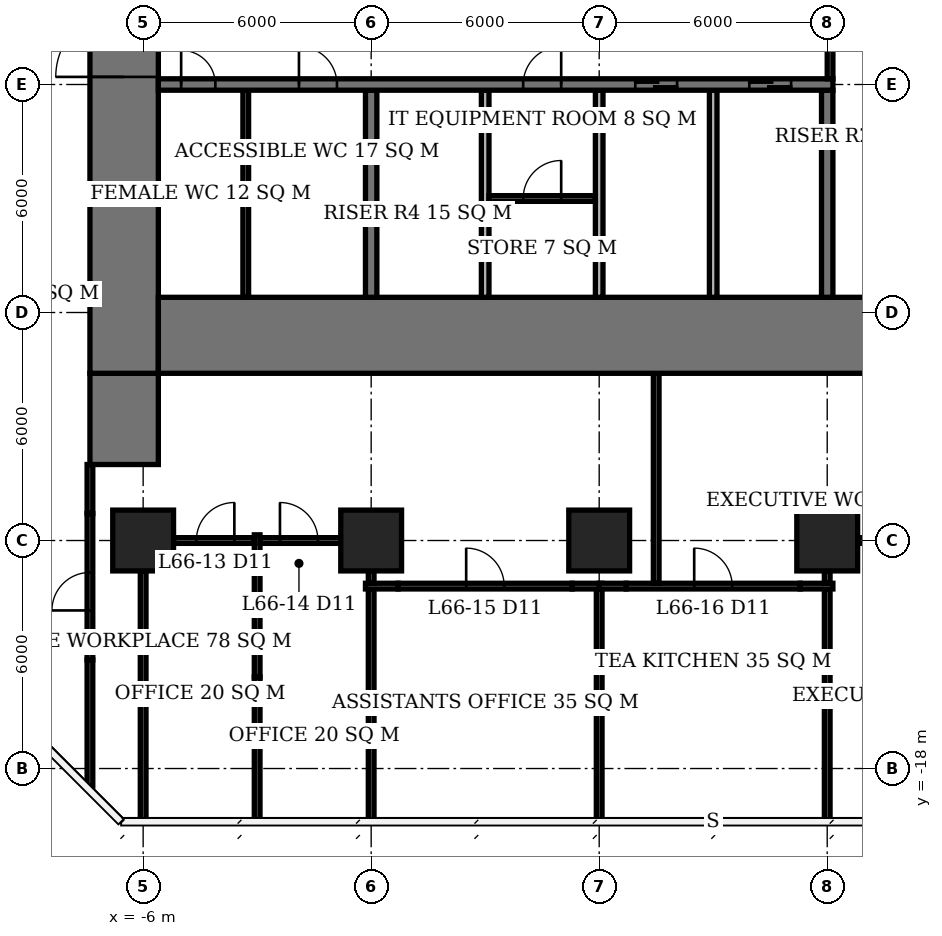
"""IFC4 building model, lengths in metres.
Left out: names, types, materials, properties, quantities, classifications, styles, units other than length and angle.
Written with IfcOpenShell. Run it as: python <this file> out.ifc"""

import sys

from ifc_helpers import new_model, si_unit, direction, frame, frame_2d, origin, origin_2d, place, context, subcontext, project, spatial, rectangle, extrude, element, fill, save


model = new_model("IFC4")
c1 = context("Model", 3, precision=1e-05, world=origin(), true_north=direction((0.0, 1.0)))
c2 = subcontext(c1, "Body", "Model", "MODEL_VIEW")
j1 = project(units=[si_unit("LENGTHUNIT", "METRE"), si_unit("PLANEANGLEUNIT", "RADIAN")], contexts=[c1])
p1 = place(None, origin())
s1 = spatial("IfcSite", under=j1, at=p1, CompositionType="ELEMENT")
p2 = place(p1, origin())
s2 = spatial("IfcBuilding", under=s1, at=p2, CompositionType="ELEMENT")
p3 = place(p2, frame((0.0, 0.0, 268.4)))
s3 = spatial("IfcBuildingStorey", under=s2, at=p3, CompositionType="ELEMENT", Elevation=268.4)
for number, where, z_axis, x_axis in (
    (1, (-6.0, -12.0, 0.0), (0.0, 0.0, 1.0), (1.0, 0.0, 0.0)),
    (2, (0.0, -12.0, 0.0), (0.0, 0.0, 1.0), (1.0, 0.0, 0.0)),
    (3, (6.0, -12.0, 0.0), (0.0, 0.0, 1.0), (1.0, 0.0, 0.0)),
    (4, (12.0, -12.0, 0.0), (0.0, 0.0, 1.0), (1.0, 0.0, 0.0)),
):
    element("IfcColumn", number, at=place(p3, frame(where, z_axis=z_axis, x_axis=x_axis)), inside=s3, PredefinedType="COLUMN", context=c2, shape_type="SweptSolid", body=[
        extrude(rectangle(XDim=1.6, YDim=1.6, at=origin_2d()), origin(), (0.0, 0.0, 1.0), 3.9),
    ])
p4 = place(p3, frame((-5.6, -6.6, 0.0), z_axis=(0.0, 0.0, 1.0), x_axis=(1.0, 0.0, 0.0)))
e5 = element("IfcWall", 5, at=p4, inside=s3, PredefinedType="SHEAR", context=c2, shape_type="SweptSolid", body=[
    extrude(rectangle(XDim=23.2, YDim=2.0, at=frame_2d((11.6, 0.0))), origin(), (0.0, 0.0, 1.0), 3.9),
])
p5 = place(p3, frame((-6.5, -7.6, 0.0), z_axis=(0.0, 0.0, 1.0), x_axis=(0.0, 1.0, 0.0)))
e6 = element("IfcWall", 6, at=p5, inside=s3, PredefinedType="SHEAR", context=c2, shape_type="SweptSolid", body=[
    extrude(rectangle(XDim=21.2, YDim=1.8, at=frame_2d((10.6, 0.0))), origin(), (0.0, 0.0, 1.0), 3.9),
])
p6 = place(p5, frame((7.8, 0.0, 0.0)))
e7 = element("IfcOpeningElement", 7, at=p6, cuts=e6, PredefinedType="OPENING", context=c2, shape_type="SweptSolid", body=[
    extrude(rectangle(XDim=1.8, YDim=2.4, at=frame_2d((0.9, 1.2))), frame((0.0, 0.91, 0.0), z_axis=(0.0, -1.0, 0.0), x_axis=(1.0, 0.0, 0.0)), (0.0, 0.0, 1.0), 1.82),
])
p7 = place(p3, frame((-6.5, -10.0, 0.0), z_axis=(0.0, 0.0, 1.0), x_axis=(0.0, 1.0, 0.0)))
e8 = element("IfcWall", 8, at=p7, inside=s3, PredefinedType="SHEAR", context=c2, shape_type="SweptSolid", body=[
    extrude(rectangle(XDim=2.4, YDim=1.8, at=frame_2d((1.2, 0.0))), origin(), (0.0, 0.0, 1.0), 3.9),
])
p8 = place(p3, frame((-5.6, 0.0, 0.0), z_axis=(0.0, 0.0, 1.0), x_axis=(1.0, 0.0, 0.0)))
e9 = element("IfcWall", 9, at=p8, inside=s3, PredefinedType="SHEAR", context=c2, shape_type="SweptSolid", body=[
    extrude(rectangle(XDim=17.75, YDim=0.3, at=frame_2d((8.875, 0.0))), origin(), (0.0, 0.0, 1.0), 3.9),
])
p9 = place(p8, frame((0.6, 0.0, 0.0)))
e10 = element("IfcOpeningElement", 10, at=p9, cuts=e9, PredefinedType="OPENING", context=c2, shape_type="SweptSolid", body=[
    extrude(rectangle(XDim=0.9, YDim=2.1, at=frame_2d((0.45, 1.05))), frame((0.0, 0.16, 0.0), z_axis=(0.0, -1.0, 0.0), x_axis=(1.0, 0.0, 0.0)), (0.0, 0.0, 1.0), 0.32),
])
p10 = place(p8, frame((3.7, 0.0, 0.0)))
e11 = element("IfcOpeningElement", 11, at=p10, cuts=e9, PredefinedType="OPENING", context=c2, shape_type="SweptSolid", body=[
    extrude(rectangle(XDim=1.0, YDim=2.1, at=frame_2d((0.5, 1.05))), frame((0.0, 0.16, 0.0), z_axis=(0.0, -1.0, 0.0), x_axis=(1.0, 0.0, 0.0)), (0.0, 0.0, 1.0), 0.32),
])
p11 = place(p8, frame((9.6, 0.0, 0.0)))
e12 = element("IfcOpeningElement", 12, at=p11, cuts=e9, PredefinedType="OPENING", context=c2, shape_type="SweptSolid", body=[
    extrude(rectangle(XDim=1.0, YDim=2.1, at=frame_2d((0.5, 1.05))), frame((0.0, 0.16, 0.0), z_axis=(0.0, -1.0, 0.0), x_axis=(1.0, 0.0, 0.0)), (0.0, 0.0, 1.0), 0.32),
])
p12 = place(p8, frame((12.55, 0.0, 0.0)))
e13 = element("IfcOpeningElement", 13, at=p12, cuts=e9, PredefinedType="OPENING", context=c2, shape_type="SweptSolid", body=[
    extrude(rectangle(XDim=1.1, YDim=2.1, at=frame_2d((0.55, 1.05))), frame((0.0, 0.16, 0.0), z_axis=(0.0, -1.0, 0.0), x_axis=(1.0, 0.0, 0.0)), (0.0, 0.0, 1.0), 0.32),
])
p13 = place(p8, frame((15.55, 0.0, 0.0)))
e14 = element("IfcOpeningElement", 14, at=p13, cuts=e9, PredefinedType="OPENING", context=c2, shape_type="SweptSolid", body=[
    extrude(rectangle(XDim=1.1, YDim=2.1, at=frame_2d((0.55, 1.05))), frame((0.0, 0.16, 0.0), z_axis=(0.0, -1.0, 0.0), x_axis=(1.0, 0.0, 0.0)), (0.0, 0.0, 1.0), 0.32),
])
for number, where, z_axis, x_axis in (
    (15, (0.0, -5.6, 0.0), (0.0, 0.0, 1.0), (0.0, 1.0, 0.0)),
    (16, (12.0, -5.6, 0.0), (0.0, 0.0, 1.0), (0.0, 1.0, 0.0)),
):
    element("IfcWall", number, at=place(p3, frame(where, z_axis=z_axis, x_axis=x_axis)), inside=s3, PredefinedType="SHEAR", context=c2, shape_type="SweptSolid", body=[
        extrude(rectangle(XDim=5.45, YDim=0.3, at=frame_2d((2.725, 0.0))), origin(), (0.0, 0.0, 1.0), 3.9),
    ])
for number, where, z_axis, x_axis in (
    (17, (3.0, -5.6, 0.0), (0.0, 0.0, 1.0), (0.0, 1.0, 0.0)),
    (18, (6.0, -5.6, 0.0), (0.0, 0.0, 1.0), (0.0, 1.0, 0.0)),
    (19, (9.0, -5.6, 0.0), (0.0, 0.0, 1.0), (0.0, 1.0, 0.0)),
):
    element("IfcWall", number, at=place(p3, frame(where, z_axis=z_axis, x_axis=x_axis)), inside=s3, PredefinedType="SOLIDWALL", context=c2, shape_type="SweptSolid", body=[
        extrude(rectangle(XDim=5.45, YDim=0.2, at=frame_2d((2.725, 0.0))), origin(), (0.0, 0.0, 1.0), 3.9),
    ])
p14 = place(p3, frame((-3.3, -5.6, 0.0), z_axis=(0.0, 0.0, 1.0), x_axis=(0.0, 1.0, 0.0)))
e20 = element("IfcWall", 20, at=p14, inside=s3, PredefinedType="PLUMBINGWALL", context=c2, shape_type="SweptSolid", body=[
    extrude(rectangle(XDim=5.45, YDim=0.15, at=frame_2d((2.725, 0.0))), origin(), (0.0, 0.0, 1.0), 3.65),
])
p15 = place(p3, frame((3.1, -3.0, 0.0), z_axis=(0.0, 0.0, 1.0), x_axis=(1.0, 0.0, 0.0)))
e21 = element("IfcWall", 21, at=p15, inside=s3, PredefinedType="PARTITIONING", context=c2, shape_type="SweptSolid", body=[
    extrude(rectangle(XDim=2.8, YDim=0.15, at=frame_2d((1.4, 0.0))), origin(), (0.0, 0.0, 1.0), 3.65),
])
p16 = place(p15, frame((0.9, 0.0, 0.0)))
e22 = element("IfcOpeningElement", 22, at=p16, cuts=e21, PredefinedType="OPENING", context=c2, shape_type="SweptSolid", body=[
    extrude(rectangle(XDim=1.0, YDim=2.1, at=frame_2d((0.5, 1.05))), frame((0.0, 0.085, 0.0), z_axis=(0.0, -1.0, 0.0), x_axis=(1.0, 0.0, 0.0)), (0.0, 0.0, 1.0), 0.17),
])
p17 = place(p3, frame((-0.15, -13.2, 0.0), z_axis=(0.0, 0.0, 1.0), x_axis=(1.0, 0.0, 0.0)))
e23 = element("IfcWall", 23, at=p17, inside=s3, PredefinedType="PARTITIONING", context=c2, shape_type="SweptSolid", body=[
    extrude(rectangle(XDim=0.86, YDim=0.15, at=frame_2d((0.43, 0.0))), origin(), (0.0, 0.0, 1.0), 2.65),
])
p18 = place(p3, frame((0.71, -13.2, 0.0), z_axis=(0.0, 0.0, 1.0), x_axis=(1.0, 0.0, 0.0)))
e24 = element("IfcWall", 24, at=p18, inside=s3, PredefinedType="PARTITIONING", context=c2, shape_type="SweptSolid", body=[
    extrude(rectangle(XDim=4.58, YDim=0.15, at=frame_2d((2.29, 0.0))), origin(), (0.0, 0.0, 1.0), 3.65),
])
p19 = place(p18, frame((1.79, 0.0, 0.0)))
e25 = element("IfcOpeningElement", 25, at=p19, cuts=e24, PredefinedType="OPENING", context=c2, shape_type="SweptSolid", body=[
    extrude(rectangle(XDim=1.0, YDim=2.4, at=frame_2d((0.5, 1.2))), frame((0.0, 0.085, 0.0), z_axis=(0.0, -1.0, 0.0), x_axis=(1.0, 0.0, 0.0)), (0.0, 0.0, 1.0), 0.17),
])
p20 = place(p3, frame((5.29, -13.2, 0.0), z_axis=(0.0, 0.0, 1.0), x_axis=(1.0, 0.0, 0.0)))
e26 = element("IfcWall", 26, at=p20, inside=s3, PredefinedType="PARTITIONING", context=c2, shape_type="SweptSolid", body=[
    extrude(rectangle(XDim=0.785, YDim=0.15, at=frame_2d((0.393, 0.0))), origin(), (0.0, 0.0, 1.0), 2.65),
])
p21 = place(p3, frame((6.0, -13.2, 0.0), z_axis=(0.0, 0.0, 1.0), x_axis=(1.0, 0.0, 0.0)))
e27 = element("IfcWall", 27, at=p21, inside=s3, PredefinedType="PARTITIONING", context=c2, shape_type="SweptSolid", body=[
    extrude(rectangle(XDim=0.71, YDim=0.15, at=frame_2d((0.355, 0.0))), origin(), (0.0, 0.0, 1.0), 2.65),
])
p22 = place(p3, frame((6.71, -13.2, 0.0), z_axis=(0.0, 0.0, 1.0), x_axis=(1.0, 0.0, 0.0)))
e28 = element("IfcWall", 28, at=p22, inside=s3, PredefinedType="PARTITIONING", context=c2, shape_type="SweptSolid", body=[
    extrude(rectangle(XDim=4.58, YDim=0.15, at=frame_2d((2.29, 0.0))), origin(), (0.0, 0.0, 1.0), 3.65),
])
p23 = place(p22, frame((1.79, 0.0, 0.0)))
e29 = element("IfcOpeningElement", 29, at=p23, cuts=e28, PredefinedType="OPENING", context=c2, shape_type="SweptSolid", body=[
    extrude(rectangle(XDim=1.0, YDim=2.4, at=frame_2d((0.5, 1.2))), frame((0.0, 0.085, 0.0), z_axis=(0.0, -1.0, 0.0), x_axis=(1.0, 0.0, 0.0)), (0.0, 0.0, 1.0), 0.17),
])
p24 = place(p3, frame((11.29, -13.2, 0.0), z_axis=(0.0, 0.0, 1.0), x_axis=(1.0, 0.0, 0.0)))
e30 = element("IfcWall", 30, at=p24, inside=s3, PredefinedType="PARTITIONING", context=c2, shape_type="SweptSolid", body=[
    extrude(rectangle(XDim=0.86, YDim=0.15, at=frame_2d((0.43, 0.0))), origin(), (0.0, 0.0, 1.0), 2.65),
])
p25 = place(p3, frame((-5.2, -12.0, 0.0), z_axis=(0.0, 0.0, 1.0), x_axis=(1.0, 0.0, 0.0)))
e31 = element("IfcWall", 31, at=p25, inside=s3, PredefinedType="PARTITIONING", context=c2, shape_type="SweptSolid", body=[
    extrude(rectangle(XDim=2.125, YDim=0.15, at=frame_2d((1.062, 0.0))), origin(), (0.0, 0.0, 1.0), 3.65),
])
p26 = place(p25, frame((0.6, 0.0, 0.0)))
e32 = element("IfcOpeningElement", 32, at=p26, cuts=e31, PredefinedType="OPENING", context=c2, shape_type="SweptSolid", body=[
    extrude(rectangle(XDim=1.0, YDim=2.4, at=frame_2d((0.5, 1.2))), frame((0.0, 0.085, 0.0), z_axis=(0.0, -1.0, 0.0), x_axis=(1.0, 0.0, 0.0)), (0.0, 0.0, 1.0), 0.17),
])
p27 = place(p3, frame((-2.925, -12.0, 0.0), z_axis=(0.0, 0.0, 1.0), x_axis=(1.0, 0.0, 0.0)))
e33 = element("IfcWall", 33, at=p27, inside=s3, PredefinedType="PARTITIONING", context=c2, shape_type="SweptSolid", body=[
    extrude(rectangle(XDim=2.125, YDim=0.15, at=frame_2d((1.062, 0.0))), origin(), (0.0, 0.0, 1.0), 3.65),
])
p28 = place(p27, frame((0.525, 0.0, 0.0)))
e34 = element("IfcOpeningElement", 34, at=p28, cuts=e33, PredefinedType="OPENING", context=c2, shape_type="SweptSolid", body=[
    extrude(rectangle(XDim=1.0, YDim=2.4, at=frame_2d((0.5, 1.2))), frame((0.0, 0.085, 0.0), z_axis=(0.0, -1.0, 0.0), x_axis=(1.0, 0.0, 0.0)), (0.0, 0.0, 1.0), 0.17),
])
p29 = place(p3, frame((12.8, -12.0, 0.0), z_axis=(0.0, 0.0, 1.0), x_axis=(1.0, 0.0, 0.0)))
e35 = element("IfcWall", 35, at=p29, inside=s3, PredefinedType="PARTITIONING", context=c2, shape_type="SweptSolid", body=[
    extrude(rectangle(XDim=4.3, YDim=0.15, at=frame_2d((2.15, 0.0))), origin(), (0.0, 0.0, 1.0), 3.65),
])
p30 = place(p29, frame((1.65, 0.0, 0.0)))
e36 = element("IfcOpeningElement", 36, at=p30, cuts=e35, PredefinedType="OPENING", context=c2, shape_type="SweptSolid", body=[
    extrude(rectangle(XDim=1.0, YDim=2.4, at=frame_2d((0.5, 1.2))), frame((0.0, 0.085, 0.0), z_axis=(0.0, -1.0, 0.0), x_axis=(1.0, 0.0, 0.0)), (0.0, 0.0, 1.0), 0.17),
])
p31 = place(p3, frame((-6.0, -19.375, 0.0), z_axis=(0.0, 0.0, 1.0), x_axis=(0.0, 1.0, 0.0)))
e37 = element("IfcWall", 37, at=p31, inside=s3, PredefinedType="PARTITIONING", context=c2, shape_type="SweptSolid", body=[
    extrude(rectangle(XDim=3.065, YDim=0.15, at=frame_2d((1.532, 0.0))), origin(), (0.0, 0.0, 1.0), 3.65),
])
p32 = place(p3, frame((-6.0, -16.31, 0.0), z_axis=(0.0, 0.0, 1.0), x_axis=(0.0, 1.0, 0.0)))
e38 = element("IfcWall", 38, at=p32, inside=s3, PredefinedType="PARTITIONING", context=c2, shape_type="SweptSolid", body=[
    extrude(rectangle(XDim=3.51, YDim=0.15, at=frame_2d((1.755, 0.0))), origin(), (0.0, 0.0, 1.0), 2.65),
])
p33 = place(p3, frame((-3.0, -19.375, 0.0), z_axis=(0.0, 0.0, 1.0), x_axis=(0.0, 1.0, 0.0)))
e39 = element("IfcWall", 39, at=p33, inside=s3, PredefinedType="PARTITIONING", context=c2, shape_type="SweptSolid", body=[
    extrude(rectangle(XDim=3.065, YDim=0.15, at=frame_2d((1.532, 0.0))), origin(), (0.0, 0.0, 1.0), 3.65),
])
p34 = place(p3, frame((-3.0, -16.31, 0.0), z_axis=(0.0, 0.0, 1.0), x_axis=(0.0, 1.0, 0.0)))
e40 = element("IfcWall", 40, at=p34, inside=s3, PredefinedType="PARTITIONING", context=c2, shape_type="SweptSolid", body=[
    extrude(rectangle(XDim=0.72, YDim=0.15, at=frame_2d((0.36, 0.0))), origin(), (0.0, 0.0, 1.0), 2.65),
])
p35 = place(p3, frame((-3.0, -15.59, 0.0), z_axis=(0.0, 0.0, 1.0), x_axis=(0.0, 1.0, 0.0)))
e41 = element("IfcWall", 41, at=p35, inside=s3, PredefinedType="PARTITIONING", context=c2, shape_type="SweptSolid", body=[
    extrude(rectangle(XDim=3.74, YDim=0.15, at=frame_2d((1.87, 0.0))), origin(), (0.0, 0.0, 1.0), 3.65),
])
p36 = place(p3, frame((0.0, -19.375, 0.0), z_axis=(0.0, 0.0, 1.0), x_axis=(0.0, 1.0, 0.0)))
e42 = element("IfcWall", 42, at=p36, inside=s3, PredefinedType="PARTITIONING", context=c2, shape_type="SweptSolid", body=[
    extrude(rectangle(XDim=3.065, YDim=0.15, at=frame_2d((1.532, 0.0))), origin(), (0.0, 0.0, 1.0), 3.65),
])
p37 = place(p3, frame((0.0, -16.31, 0.0), z_axis=(0.0, 0.0, 1.0), x_axis=(0.0, 1.0, 0.0)))
e43 = element("IfcWall", 43, at=p37, inside=s3, PredefinedType="PARTITIONING", context=c2, shape_type="SweptSolid", body=[
    extrude(rectangle(XDim=3.035, YDim=0.15, at=frame_2d((1.518, 0.0))), origin(), (0.0, 0.0, 1.0), 2.65),
])
p38 = place(p3, frame((0.0, -13.125, 0.0), z_axis=(0.0, 0.0, 1.0), x_axis=(0.0, 1.0, 0.0)))
e44 = element("IfcWall", 44, at=p38, inside=s3, PredefinedType="PARTITIONING", context=c2, shape_type="SweptSolid", body=[
    extrude(rectangle(XDim=0.325, YDim=0.15, at=frame_2d((0.163, 0.0))), origin(), (0.0, 0.0, 1.0), 2.65),
])
p39 = place(p3, frame((6.0, -19.35, 0.0), z_axis=(0.0, 0.0, 1.0), x_axis=(0.0, 1.0, 0.0)))
e45 = element("IfcWall", 45, at=p39, inside=s3, PredefinedType="PARTITIONING", context=c2, shape_type="SweptSolid", body=[
    extrude(rectangle(XDim=3.04, YDim=0.15, at=frame_2d((1.52, 0.0))), origin(), (0.0, 0.0, 1.0), 3.65),
])
p40 = place(p3, frame((6.0, -16.31, 0.0), z_axis=(0.0, 0.0, 1.0), x_axis=(0.0, 1.0, 0.0)))
e46 = element("IfcWall", 46, at=p40, inside=s3, PredefinedType="PARTITIONING", context=c2, shape_type="SweptSolid", body=[
    extrude(rectangle(XDim=3.035, YDim=0.15, at=frame_2d((1.518, 0.0))), origin(), (0.0, 0.0, 1.0), 2.65),
])
p41 = place(p3, frame((12.0, -19.35, 0.0), z_axis=(0.0, 0.0, 1.0), x_axis=(0.0, 1.0, 0.0)))
e47 = element("IfcWall", 47, at=p41, inside=s3, PredefinedType="PARTITIONING", context=c2, shape_type="SweptSolid", body=[
    extrude(rectangle(XDim=3.04, YDim=0.15, at=frame_2d((1.52, 0.0))), origin(), (0.0, 0.0, 1.0), 3.65),
])
p42 = place(p3, frame((12.0, -16.31, 0.0), z_axis=(0.0, 0.0, 1.0), x_axis=(0.0, 1.0, 0.0)))
e48 = element("IfcWall", 48, at=p42, inside=s3, PredefinedType="PARTITIONING", context=c2, shape_type="SweptSolid", body=[
    extrude(rectangle(XDim=3.035, YDim=0.15, at=frame_2d((1.518, 0.0))), origin(), (0.0, 0.0, 1.0), 2.65),
])
p43 = place(p3, frame((12.0, -13.125, 0.0), z_axis=(0.0, 0.0, 1.0), x_axis=(0.0, 1.0, 0.0)))
e49 = element("IfcWall", 49, at=p43, inside=s3, PredefinedType="PARTITIONING", context=c2, shape_type="SweptSolid", body=[
    extrude(rectangle(XDim=0.325, YDim=0.15, at=frame_2d((0.163, 0.0))), origin(), (0.0, 0.0, 1.0), 2.65),
])
p44 = place(p3, frame((-7.4, -18.464, 0.0), z_axis=(0.0, 0.0, 1.0), x_axis=(0.0, 1.0, 0.0)))
e50 = element("IfcWall", 50, at=p44, inside=s3, PredefinedType="PARTITIONING", context=c2, shape_type="SweptSolid", body=[
    extrude(rectangle(XDim=3.324, YDim=0.15, at=frame_2d((1.662, 0.0))), origin(), (0.0, 0.0, 1.0), 3.65),
])
p45 = place(p3, frame((-7.4, -15.14, 0.0), z_axis=(0.0, 0.0, 1.0), x_axis=(0.0, 1.0, 0.0)))
e51 = element("IfcWall", 51, at=p45, inside=s3, PredefinedType="PARTITIONING", context=c2, shape_type="SweptSolid", body=[
    extrude(rectangle(XDim=3.85, YDim=0.15, at=frame_2d((1.925, 0.0))), origin(), (0.0, 0.0, 1.0), 2.65),
])
p46 = place(p45, frame((1.3, 0.0, 0.0)))
e52 = element("IfcOpeningElement", 52, at=p46, cuts=e51, PredefinedType="OPENING", context=c2, shape_type="SweptSolid", body=[
    extrude(rectangle(XDim=1.0, YDim=2.1, at=frame_2d((0.5, 1.05))), frame((0.0, 0.085, 0.0), z_axis=(0.0, -1.0, 0.0), x_axis=(1.0, 0.0, 0.0)), (0.0, 0.0, 1.0), 0.17),
])
p47 = place(p3, frame((-7.4, -11.29, 0.0), z_axis=(0.0, 0.0, 1.0), x_axis=(0.0, 1.0, 0.0)))
e53 = element("IfcWall", 53, at=p47, inside=s3, PredefinedType="PARTITIONING", context=c2, shape_type="SweptSolid", body=[
    extrude(rectangle(XDim=1.29, YDim=0.15, at=frame_2d((0.645, 0.0))), origin(), (0.0, 0.0, 1.0), 3.65),
])
p48 = place(p3, frame((7.5, -13.125, 0.0), z_axis=(0.0, 0.0, 1.0), x_axis=(0.0, 1.0, 0.0)))
e54 = element("IfcWall", 54, at=p48, inside=s3, PredefinedType="PARTITIONING", context=c2, shape_type="SweptSolid", body=[
    extrude(rectangle(XDim=5.525, YDim=0.15, at=frame_2d((2.762, 0.0))), origin(), (0.0, 0.0, 1.0), 3.65),
])
p49 = place(p3, frame((12.075, 0.15, 0.0), z_axis=(0.0, 0.0, 1.0), x_axis=(0.0, 1.0, 0.0)))
e55 = element("IfcWall", 55, at=p49, inside=s3, PredefinedType="PARTITIONING", context=c2, shape_type="SweptSolid", body=[
    extrude(rectangle(XDim=3.0, YDim=0.15, at=frame_2d((1.5, 0.0))), origin(), (0.0, 0.0, 1.0), 3.65),
])
p50 = place(p6, origin())
e56 = element("IfcDoor", 56, at=p50, inside=s3, OperationType="DOUBLE_DOOR_SINGLE_SWING", PredefinedType="DOOR", context=c2, shape_type="SweptSolid", body=[
    extrude(rectangle(XDim=1.8, YDim=2.4, at=frame_2d((0.9, 1.2))), frame((0.0, 0.025, 0.0), z_axis=(0.0, -1.0, 0.0), x_axis=(1.0, 0.0, 0.0)), (0.0, 0.0, 1.0), 0.05),
])
fill(e7, e56)
p51 = place(p9, origin())
e57 = element("IfcDoor", 57, at=p51, inside=s3, OperationType="SINGLE_SWING_LEFT", PredefinedType="DOOR", context=c2, shape_type="SweptSolid", body=[
    extrude(rectangle(XDim=0.9, YDim=2.1, at=frame_2d((0.45, 1.05))), frame((0.0, 0.025, 0.0), z_axis=(0.0, -1.0, 0.0), x_axis=(1.0, 0.0, 0.0)), (0.0, 0.0, 1.0), 0.05),
])
fill(e10, e57)
p52 = place(p10, origin())
e58 = element("IfcDoor", 58, at=p52, inside=s3, OperationType="SINGLE_SWING_LEFT", PredefinedType="DOOR", context=c2, shape_type="SweptSolid", body=[
    extrude(rectangle(XDim=1.0, YDim=2.1, at=frame_2d((0.5, 1.05))), frame((0.0, 0.025, 0.0), z_axis=(0.0, -1.0, 0.0), x_axis=(1.0, 0.0, 0.0)), (0.0, 0.0, 1.0), 0.05),
])
fill(e11, e58)
p53 = place(p16, origin())
e59 = element("IfcDoor", 59, at=p53, inside=s3, OperationType="SINGLE_SWING_RIGHT", PredefinedType="DOOR", context=c2, shape_type="SweptSolid", body=[
    extrude(rectangle(XDim=1.0, YDim=2.1, at=frame_2d((0.5, 1.05))), frame((0.0, 0.025, 0.0), z_axis=(0.0, -1.0, 0.0), x_axis=(1.0, 0.0, 0.0)), (0.0, 0.0, 1.0), 0.05),
])
fill(e22, e59)
p54 = place(p11, origin())
e60 = element("IfcDoor", 60, at=p54, inside=s3, OperationType="SINGLE_SWING_RIGHT", PredefinedType="DOOR", context=c2, shape_type="SweptSolid", body=[
    extrude(rectangle(XDim=1.0, YDim=2.1, at=frame_2d((0.5, 1.05))), frame((0.0, 0.025, 0.0), z_axis=(0.0, -1.0, 0.0), x_axis=(1.0, 0.0, 0.0)), (0.0, 0.0, 1.0), 0.05),
])
fill(e12, e60)
p55 = place(p12, origin())
e61 = element("IfcDoor", 61, at=p55, inside=s3, OperationType="DOUBLE_DOOR_SLIDING", PredefinedType="USERDEFINED", context=c2, shape_type="SweptSolid", body=[
    extrude(rectangle(XDim=1.1, YDim=2.1, at=frame_2d((0.55, 1.05))), frame((0.0, 0.025, 0.0), z_axis=(0.0, -1.0, 0.0), x_axis=(1.0, 0.0, 0.0)), (0.0, 0.0, 1.0), 0.05),
])
fill(e13, e61)
p56 = place(p13, origin())
e62 = element("IfcDoor", 62, at=p56, inside=s3, OperationType="DOUBLE_DOOR_SLIDING", PredefinedType="USERDEFINED", context=c2, shape_type="SweptSolid", body=[
    extrude(rectangle(XDim=1.1, YDim=2.1, at=frame_2d((0.55, 1.05))), frame((0.0, 0.025, 0.0), z_axis=(0.0, -1.0, 0.0), x_axis=(1.0, 0.0, 0.0)), (0.0, 0.0, 1.0), 0.05),
])
fill(e14, e62)
p57 = place(p26, origin())
e63 = element("IfcDoor", 63, at=p57, inside=s3, OperationType="SINGLE_SWING_RIGHT", PredefinedType="DOOR", context=c2, shape_type="SweptSolid", body=[
    extrude(rectangle(XDim=1.0, YDim=2.4, at=frame_2d((0.5, 1.2))), frame((0.0, 0.025, 0.0), z_axis=(0.0, -1.0, 0.0), x_axis=(1.0, 0.0, 0.0)), (0.0, 0.0, 1.0), 0.05),
])
fill(e32, e63)
p58 = place(p28, origin())
e64 = element("IfcDoor", 64, at=p58, inside=s3, OperationType="SINGLE_SWING_LEFT", PredefinedType="DOOR", context=c2, shape_type="SweptSolid", body=[
    extrude(rectangle(XDim=1.0, YDim=2.4, at=frame_2d((0.5, 1.2))), frame((0.0, 0.025, 0.0), z_axis=(0.0, -1.0, 0.0), x_axis=(1.0, 0.0, 0.0)), (0.0, 0.0, 1.0), 0.05),
])
fill(e34, e64)
p59 = place(p19, origin())
e65 = element("IfcDoor", 65, at=p59, inside=s3, OperationType="SINGLE_SWING_LEFT", PredefinedType="DOOR", context=c2, shape_type="SweptSolid", body=[
    extrude(rectangle(XDim=1.0, YDim=2.4, at=frame_2d((0.5, 1.2))), frame((0.0, 0.025, 0.0), z_axis=(0.0, -1.0, 0.0), x_axis=(1.0, 0.0, 0.0)), (0.0, 0.0, 1.0), 0.05),
])
fill(e25, e65)
p60 = place(p23, origin())
e66 = element("IfcDoor", 66, at=p60, inside=s3, OperationType="SINGLE_SWING_LEFT", PredefinedType="DOOR", context=c2, shape_type="SweptSolid", body=[
    extrude(rectangle(XDim=1.0, YDim=2.4, at=frame_2d((0.5, 1.2))), frame((0.0, 0.025, 0.0), z_axis=(0.0, -1.0, 0.0), x_axis=(1.0, 0.0, 0.0)), (0.0, 0.0, 1.0), 0.05),
])
fill(e29, e66)
p61 = place(p46, origin())
e67 = element("IfcDoor", 67, at=p61, inside=s3, OperationType="SINGLE_SWING_LEFT", PredefinedType="DOOR", context=c2, shape_type="SweptSolid", body=[
    extrude(rectangle(XDim=1.0, YDim=2.1, at=frame_2d((0.5, 1.05))), frame((0.0, 0.025, 0.0), z_axis=(0.0, -1.0, 0.0), x_axis=(1.0, 0.0, 0.0)), (0.0, 0.0, 1.0), 0.05),
])
fill(e52, e67)
save(model, sys.argv[1])
